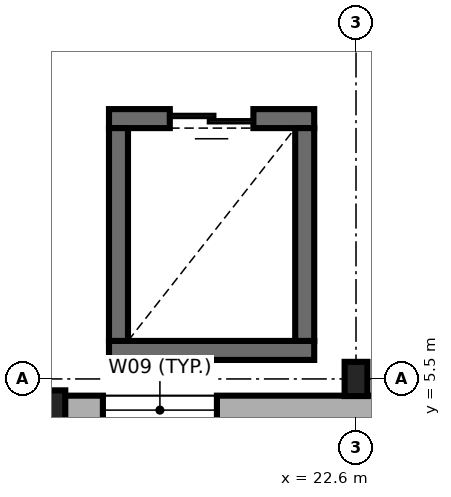
"""IFC4 building model, lengths in metres.
Left out: names, types, materials, properties, quantities, classifications, styles, units other than length and angle.
Written with IfcOpenShell. Run it as: python <this file> out.ifc"""

import sys

from ifc_helpers import new_model, si_unit, direction, frame, frame_2d, origin, origin_2d, place, context, subcontext, project, spatial, rectangle, i_section, extrude, element, fill, save


model = new_model("IFC4")
c1 = context("Model", 3, precision=1e-05, world=origin(), true_north=direction((0.0, 1.0)))
c2 = subcontext(c1, "Body", "Model", "MODEL_VIEW")
j1 = project(units=[si_unit("LENGTHUNIT", "METRE"), si_unit("PLANEANGLEUNIT", "RADIAN")], contexts=[c1])
p1 = place(None, origin())
s1 = spatial("IfcSite", under=j1, at=p1, CompositionType="ELEMENT")
p2 = place(p1, origin())
s2 = spatial("IfcBuilding", under=s1, at=p2, CompositionType="ELEMENT")
p3 = place(p2, frame((0.0, 0.0, 4.8)))
s3 = spatial("IfcBuildingStorey", under=s2, at=p3, CompositionType="ELEMENT", Elevation=4.8)
p4 = place(p3, frame((18.6, 5.05, 0.0), z_axis=(0.0, 0.0, 1.0), x_axis=(1.0, 0.0, 0.0)))
e1 = element("IfcColumn", 1, at=p4, inside=s3, PredefinedType="PILASTER", context=c2, shape_type="SweptSolid", body=[
    extrude(rectangle(XDim=0.35, YDim=0.6, at=origin_2d()), origin(), (0.0, 0.0, 1.0), 4.5),
])
p5 = place(p3, frame((22.6, 5.5, 0.0), z_axis=(0.0, 0.0, 1.0), x_axis=(1.0, 0.0, 0.0)))
e2 = element("IfcColumn", 2, at=p5, inside=s3, PredefinedType="COLUMN", context=c2, shape_type="SweptSolid", body=[
    extrude(i_section(OverallWidth=0.3, OverallDepth=0.45, WebThickness=0.014, FlangeThickness=0.026, FilletRadius=0.027, at=origin_2d()), origin(), (0.0, 0.0, 1.0), 4.5),
])
p6 = place(p3, frame((19.35, 5.875, 0.0), z_axis=(0.0, 0.0, 1.0), x_axis=(1.0, 0.0, 0.0)))
e3 = element("IfcWall", 3, at=p6, inside=s3, PredefinedType="SHEAR", context=c2, shape_type="SweptSolid", body=[
    extrude(rectangle(XDim=2.7, YDim=0.25, at=frame_2d((1.35, 0.0))), origin(), (0.0, 0.0, 1.0), 4.5),
])
p7 = place(p3, frame((22.05, 8.925, 0.0), z_axis=(0.0, 0.0, 1.0), x_axis=(-1.0, 0.0, 0.0)))
e4 = element("IfcWall", 4, at=p7, inside=s3, PredefinedType="SHEAR", context=c2, shape_type="SweptSolid", body=[
    extrude(rectangle(XDim=2.7, YDim=0.25, at=frame_2d((1.35, 0.0))), origin(), (0.0, 0.0, 1.0), 4.5),
])
p8 = place(p7, frame((0.8, 0.0, 0.0)))
e5 = element("IfcOpeningElement", 5, at=p8, cuts=e4, PredefinedType="OPENING", context=c2, shape_type="SweptSolid", body=[
    extrude(rectangle(XDim=1.1, YDim=2.15, at=frame_2d((0.55, 1.075))), frame((0.0, 0.135, 0.0), z_axis=(0.0, -1.0, 0.0), x_axis=(1.0, 0.0, 0.0)), (0.0, 0.0, 1.0), 0.27),
])
for number, where, z_axis, x_axis in (
    (6, (19.475, 8.8, 0.0), (0.0, 0.0, 1.0), (0.0, -1.0, 0.0)),
    (7, (21.925, 6.0, 0.0), (0.0, 0.0, 1.0), (0.0, 1.0, 0.0)),
):
    element("IfcWall", number, at=place(p3, frame(where, z_axis=z_axis, x_axis=x_axis)), inside=s3, PredefinedType="SHEAR", context=c2, shape_type="SweptSolid", body=[
        extrude(rectangle(XDim=2.8, YDim=0.25, at=frame_2d((1.4, 0.0))), origin(), (0.0, 0.0, 1.0), 4.5),
    ])
p9 = place(p3, frame((5.962, 5.09, 0.0), z_axis=(0.0, 0.0, 1.0), x_axis=(1.0, 0.0, 0.0)))
e8 = element("IfcWall", 8, at=p9, inside=s3, PredefinedType="SOLIDWALL", context=c2, shape_type="SweptSolid", body=[
    extrude(rectangle(XDim=48.176, YDim=0.38, at=frame_2d((24.088, 0.0))), origin(), (0.0, 0.0, 1.0), 4.25),
])
p10 = place(p9, frame((10.614, 0.0, 0.9)))
e9 = element("IfcOpeningElement", 9, at=p10, cuts=e8, PredefinedType="OPENING", context=c2, shape_type="SweptSolid", body=[
    extrude(rectangle(XDim=1.2, YDim=1.8, at=frame_2d((0.6, 0.9))), frame((0.0, 0.2, 0.0), z_axis=(0.0, -1.0, 0.0), x_axis=(1.0, 0.0, 0.0)), (0.0, 0.0, 1.0), 0.4),
])
p11 = place(p9, frame((13.308, 0.0, 0.9)))
e10 = element("IfcOpeningElement", 10, at=p11, cuts=e8, PredefinedType="OPENING", context=c2, shape_type="SweptSolid", body=[
    extrude(rectangle(XDim=1.5, YDim=2.1, at=frame_2d((0.75, 1.05))), frame((0.0, 0.2, 0.0), z_axis=(0.0, -1.0, 0.0), x_axis=(1.0, 0.0, 0.0)), (0.0, 0.0, 1.0), 0.4),
])
p12 = place(p9, frame((29.588, 0.0, 0.9)))
e11 = element("IfcOpeningElement", 11, at=p12, cuts=e8, PredefinedType="OPENING", context=c2, shape_type="SweptSolid", body=[
    extrude(rectangle(XDim=2.1, YDim=2.1, at=frame_2d((1.05, 1.05))), frame((0.0, 0.2, 0.0), z_axis=(0.0, -1.0, 0.0), x_axis=(1.0, 0.0, 0.0)), (0.0, 0.0, 1.0), 0.4),
])
p13 = place(p9, frame((33.288, 0.0, 0.9)))
e12 = element("IfcOpeningElement", 12, at=p13, cuts=e8, PredefinedType="OPENING", context=c2, shape_type="SweptSolid", body=[
    extrude(rectangle(XDim=2.7, YDim=2.1, at=frame_2d((1.35, 1.05))), frame((0.0, 0.2, 0.0), z_axis=(0.0, -1.0, 0.0), x_axis=(1.0, 0.0, 0.0)), (0.0, 0.0, 1.0), 0.4),
])
p14 = place(p9, frame((37.258, 0.0, 0.9)))
e13 = element("IfcOpeningElement", 13, at=p14, cuts=e8, PredefinedType="OPENING", context=c2, shape_type="SweptSolid", body=[
    extrude(rectangle(XDim=0.9, YDim=1.8, at=frame_2d((0.45, 0.9))), frame((0.0, 0.2, 0.0), z_axis=(0.0, -1.0, 0.0), x_axis=(1.0, 0.0, 0.0)), (0.0, 0.0, 1.0), 0.4),
])
p15 = place(p9, frame((39.018, 0.0, 0.9)))
e14 = element("IfcOpeningElement", 14, at=p15, cuts=e8, PredefinedType="OPENING", context=c2, shape_type="SweptSolid", body=[
    extrude(rectangle(XDim=0.9, YDim=1.8, at=frame_2d((0.45, 0.9))), frame((0.0, 0.2, 0.0), z_axis=(0.0, -1.0, 0.0), x_axis=(1.0, 0.0, 0.0)), (0.0, 0.0, 1.0), 0.4),
])
p16 = place(p9, frame((41.538, 0.0, 0.9)))
e15 = element("IfcOpeningElement", 15, at=p16, cuts=e8, PredefinedType="OPENING", context=c2, shape_type="SweptSolid", body=[
    extrude(rectangle(XDim=1.2, YDim=2.4, at=frame_2d((0.6, 1.2))), frame((0.0, 0.2, 0.0), z_axis=(0.0, -1.0, 0.0), x_axis=(1.0, 0.0, 0.0)), (0.0, 0.0, 1.0), 0.4),
])
p17 = place(p9, frame((44.538, 0.0, 0.9)))
e16 = element("IfcOpeningElement", 16, at=p17, cuts=e8, PredefinedType="OPENING", context=c2, shape_type="SweptSolid", body=[
    extrude(rectangle(XDim=1.2, YDim=1.8, at=frame_2d((0.6, 0.9))), frame((0.0, 0.2, 0.0), z_axis=(0.0, -1.0, 0.0), x_axis=(1.0, 0.0, 0.0)), (0.0, 0.0, 1.0), 0.4),
])
p18 = place(p8, origin())
e17 = element("IfcDoor", 17, at=p18, inside=s3, OperationType="DOUBLE_DOOR_SLIDING", PredefinedType="DOOR", context=c2, shape_type="SweptSolid", body=[
    extrude(rectangle(XDim=1.1, YDim=2.15, at=frame_2d((0.55, 1.075))), frame((0.0, 0.025, 0.0), z_axis=(0.0, -1.0, 0.0), x_axis=(1.0, 0.0, 0.0)), (0.0, 0.0, 1.0), 0.05),
])
fill(e5, e17)
p19 = place(p11, origin())
e18 = element("IfcWindow", 18, at=p19, inside=s3, PartitioningType="SINGLE_PANEL", PredefinedType="WINDOW", context=c2, shape_type="SweptSolid", body=[
    extrude(rectangle(XDim=1.5, YDim=2.1, at=frame_2d((0.75, 1.05))), frame((0.0, 0.03, 0.0), z_axis=(0.0, -1.0, 0.0), x_axis=(1.0, 0.0, 0.0)), (0.0, 0.0, 1.0), 0.06),
])
fill(e10, e18)
save(model, sys.argv[1])
